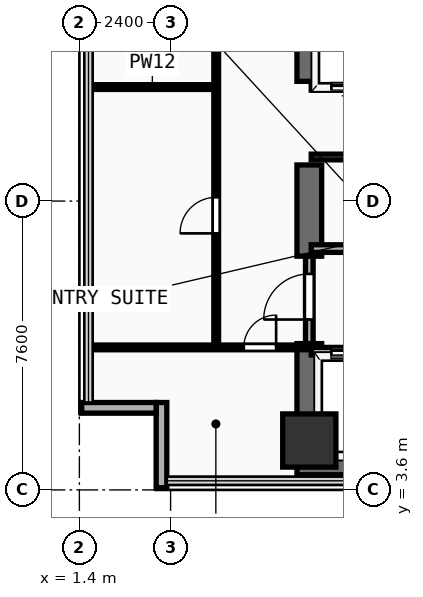
"""IFC4 building model, lengths in metres.
Left out: names, types, materials, properties, quantities, classifications, styles, units other than length and angle.
Written with IfcOpenShell. Run it as: python <this file> out.ifc"""

import sys

from ifc_helpers import new_model, si_unit, direction, frame, frame_2d, origin, origin_2d, place, context, subcontext, project, spatial, rectangle, extrude, element, fill, save


model = new_model("IFC4")
c1 = context("Model", 3, precision=1e-05, world=origin(), true_north=direction((0.0, 1.0)))
c2 = subcontext(c1, "Body", "Model", "MODEL_VIEW")
j1 = project(units=[si_unit("LENGTHUNIT", "METRE"), si_unit("PLANEANGLEUNIT", "RADIAN")], contexts=[c1])
p1 = place(None, origin())
s1 = spatial("IfcSite", under=j1, at=p1, CompositionType="ELEMENT")
p2 = place(p1, origin())
s2 = spatial("IfcBuilding", under=s1, at=p2, CompositionType="ELEMENT")
p3 = place(p2, frame((0.0, 0.0, 137.3)))
s3 = spatial("IfcBuildingStorey", under=s2, at=p3, CompositionType="ELEMENT", Elevation=137.3)
p4 = place(p3, frame((7.125, 4.325, 0.0), z_axis=(0.0, 0.0, 1.0), x_axis=(1.0, 0.0, 0.0)))
e1 = element("IfcWall", 1, at=p4, inside=s3, PredefinedType="SHEAR", context=c2, shape_type="SweptSolid", body=[
    extrude(rectangle(XDim=14.0, YDim=0.65, at=frame_2d((7.0, 0.0))), origin(), (0.0, 0.0, 1.0), 3.42),
])
p5 = place(p3, frame((7.45, 4.65, 0.0), z_axis=(0.0, 0.0, 1.0), x_axis=(0.0, 1.0, 0.0)))
e2 = element("IfcWall", 2, at=p5, inside=s3, PredefinedType="SHEAR", context=c2, shape_type="SweptSolid", body=[
    extrude(rectangle(XDim=2.8, YDim=0.65, at=frame_2d((1.4, 0.0))), origin(), (0.0, 0.0, 1.0), 3.42),
])
p6 = place(p3, frame((7.45, 9.75, 0.0), z_axis=(0.0, 0.0, 1.0), x_axis=(0.0, 1.0, 0.0)))
e3 = element("IfcWall", 3, at=p6, inside=s3, PredefinedType="SHEAR", context=c2, shape_type="SweptSolid", body=[
    extrude(rectangle(XDim=2.4, YDim=0.65, at=frame_2d((1.2, 0.0))), origin(), (0.0, 0.0, 1.0), 3.42),
])
p7 = place(p3, frame((7.45, 14.35, 0.0), z_axis=(0.0, 0.0, 1.0), x_axis=(0.0, 1.0, 0.0)))
e4 = element("IfcWall", 4, at=p7, inside=s3, PredefinedType="SHEAR", context=c2, shape_type="SweptSolid", body=[
    extrude(rectangle(XDim=4.81, YDim=0.65, at=frame_2d((2.405, 0.0))), origin(), (0.0, 0.0, 1.0), 3.42),
])
p8 = place(p3, frame((7.45, 4.9, 0.0), z_axis=(0.0, 0.0, 1.0), x_axis=(1.0, 0.0, 0.0)))
e5 = element("IfcColumn", 5, at=p8, inside=s3, PredefinedType="COLUMN", context=c2, shape_type="SweptSolid", body=[
    extrude(rectangle(XDim=1.4, YDim=1.4, at=origin_2d()), origin(), (0.0, 0.0, 1.0), 3.42),
])
p9 = place(p3, frame((3.56, 3.66, 0.0), z_axis=(0.0, 0.0, 1.0), x_axis=(0.0, 1.0, 0.0)))
e6 = element("IfcWall", 6, at=p9, inside=s3, PredefinedType="SOLIDWALL", context=c2, shape_type="SweptSolid", body=[
    extrude(rectangle(XDim=2.24, YDim=0.28, at=frame_2d((1.12, 0.0))), origin(), (0.0, 0.0, 1.0), 3.42),
])
p10 = place(p3, frame((1.46, 5.76, 0.0), z_axis=(0.0, 0.0, 1.0), x_axis=(1.0, 0.0, 0.0)))
e7 = element("IfcWall", 7, at=p10, inside=s3, PredefinedType="SOLIDWALL", context=c2, shape_type="SweptSolid", body=[
    extrude(rectangle(XDim=1.96, YDim=0.28, at=frame_2d((0.98, 0.0))), origin(), (0.0, 0.0, 1.0), 3.42),
])
p11 = place(p3, frame((7.5, 7.25, 0.0), z_axis=(0.0, 0.0, 1.0), x_axis=(1.0, 0.0, 0.0)))
e8 = element("IfcWall", 8, at=p11, inside=s3, PredefinedType="PARTITIONING", context=c2, shape_type="SweptSolid", body=[
    extrude(rectangle(XDim=8.35, YDim=0.2, at=frame_2d((4.175, 0.0))), origin(), (0.0, 0.0, 1.0), 3.42),
])
p12 = place(p11, frame((0.53, 0.0, 0.0)))
e9 = element("IfcOpeningElement", 9, at=p12, cuts=e8, PredefinedType="OPENING", context=c2, shape_type="SweptSolid", body=[
    extrude(rectangle(XDim=1.1, YDim=2.2, at=frame_2d((0.55, 1.1))), frame((0.0, 0.11, 0.0), z_axis=(0.0, -1.0, 0.0), x_axis=(1.0, 0.0, 0.0)), (0.0, 0.0, 1.0), 0.22),
])
p13 = place(p11, frame((2.37, 0.0, 0.0)))
e10 = element("IfcOpeningElement", 10, at=p13, cuts=e8, PredefinedType="OPENING", context=c2, shape_type="SweptSolid", body=[
    extrude(rectangle(XDim=1.1, YDim=2.2, at=frame_2d((0.55, 1.1))), frame((0.0, 0.11, 0.0), z_axis=(0.0, -1.0, 0.0), x_axis=(1.0, 0.0, 0.0)), (0.0, 0.0, 1.0), 0.22),
])
p14 = place(p11, frame((4.33, 0.0, 0.0)))
e11 = element("IfcOpeningElement", 11, at=p14, cuts=e8, PredefinedType="OPENING", context=c2, shape_type="SweptSolid", body=[
    extrude(rectangle(XDim=1.1, YDim=2.2, at=frame_2d((0.55, 1.1))), frame((0.0, 0.11, 0.0), z_axis=(0.0, -1.0, 0.0), x_axis=(1.0, 0.0, 0.0)), (0.0, 0.0, 1.0), 0.22),
])
p15 = place(p11, frame((6.5, 0.0, 0.0)))
e12 = element("IfcOpeningElement", 12, at=p15, cuts=e8, PredefinedType="OPENING", context=c2, shape_type="SweptSolid", body=[
    extrude(rectangle(XDim=1.1, YDim=2.2, at=frame_2d((0.55, 1.1))), frame((0.0, 0.11, 0.0), z_axis=(0.0, -1.0, 0.0), x_axis=(1.0, 0.0, 0.0)), (0.0, 0.0, 1.0), 0.22),
])
p16 = place(p3, frame((7.5, 9.95, 0.0), z_axis=(0.0, 0.0, 1.0), x_axis=(1.0, 0.0, 0.0)))
e13 = element("IfcWall", 13, at=p16, inside=s3, PredefinedType="PARTITIONING", context=c2, shape_type="SweptSolid", body=[
    extrude(rectangle(XDim=8.35, YDim=0.2, at=frame_2d((4.175, 0.0))), origin(), (0.0, 0.0, 1.0), 3.42),
])
p17 = place(p3, frame((7.45, 7.45, 0.0), z_axis=(0.0, 0.0, 1.0), x_axis=(0.0, 1.0, 0.0)))
e14 = element("IfcWall", 14, at=p17, inside=s3, PredefinedType="PARTITIONING", context=c2, shape_type="SweptSolid", body=[
    extrude(rectangle(XDim=2.3, YDim=0.2, at=frame_2d((1.15, 0.0))), origin(), (0.0, 0.0, 1.0), 2.4),
])
p18 = place(p17, frame((0.633, 0.0, 0.0)))
e15 = element("IfcOpeningElement", 15, at=p18, cuts=e14, PredefinedType="OPENING", context=c2, shape_type="SweptSolid", body=[
    extrude(rectangle(XDim=1.2, YDim=2.25, at=frame_2d((0.6, 1.125))), frame((0.0, 0.11, 0.0), z_axis=(0.0, -1.0, 0.0), x_axis=(1.0, 0.0, 0.0)), (0.0, 0.0, 1.0), 0.22),
])
p19 = place(p3, frame((7.5, 12.36, 0.0), z_axis=(0.0, 0.0, 1.0), x_axis=(1.0, 0.0, 0.0)))
e16 = element("IfcWall", 16, at=p19, inside=s3, PredefinedType="PARTITIONING", context=c2, shape_type="SweptSolid", body=[
    extrude(rectangle(XDim=7.85, YDim=0.15, at=frame_2d((3.925, 0.0))), origin(), (0.0, 0.0, 1.0), 3.42),
])
p20 = place(p19, frame((1.65, 0.0, 0.0)))
e17 = element("IfcOpeningElement", 17, at=p20, cuts=e16, PredefinedType="OPENING", context=c2, shape_type="SweptSolid", body=[
    extrude(rectangle(XDim=0.85, YDim=2.15, at=frame_2d((0.425, 1.075))), frame((0.0, 0.085, 0.0), z_axis=(0.0, -1.0, 0.0), x_axis=(1.0, 0.0, 0.0)), (0.0, 0.0, 1.0), 0.17),
])
p21 = place(p19, frame((5.329, 0.0, 0.0)))
e18 = element("IfcOpeningElement", 18, at=p21, cuts=e16, PredefinedType="OPENING", context=c2, shape_type="SweptSolid", body=[
    extrude(rectangle(XDim=0.85, YDim=2.15, at=frame_2d((0.425, 1.075))), frame((0.0, 0.085, 0.0), z_axis=(0.0, -1.0, 0.0), x_axis=(1.0, 0.0, 0.0)), (0.0, 0.0, 1.0), 0.17),
])
p22 = place(p3, frame((7.5, 14.22, 0.0), z_axis=(0.0, 0.0, 1.0), x_axis=(1.0, 0.0, 0.0)))
e19 = element("IfcWall", 19, at=p22, inside=s3, PredefinedType="PARTITIONING", context=c2, shape_type="SweptSolid", body=[
    extrude(rectangle(XDim=7.85, YDim=0.2, at=frame_2d((3.925, 0.0))), origin(), (0.0, 0.0, 1.0), 3.42),
])
p23 = place(p22, frame((0.53, 0.0, 0.0)))
e20 = element("IfcOpeningElement", 20, at=p23, cuts=e19, PredefinedType="OPENING", context=c2, shape_type="SweptSolid", body=[
    extrude(rectangle(XDim=1.1, YDim=2.2, at=frame_2d((0.55, 1.1))), frame((0.0, 0.11, 0.0), z_axis=(0.0, -1.0, 0.0), x_axis=(1.0, 0.0, 0.0)), (0.0, 0.0, 1.0), 0.22),
])
p24 = place(p22, frame((2.42, 0.0, 0.0)))
e21 = element("IfcOpeningElement", 21, at=p24, cuts=e19, PredefinedType="OPENING", context=c2, shape_type="SweptSolid", body=[
    extrude(rectangle(XDim=1.1, YDim=2.2, at=frame_2d((0.55, 1.1))), frame((0.0, 0.11, 0.0), z_axis=(0.0, -1.0, 0.0), x_axis=(1.0, 0.0, 0.0)), (0.0, 0.0, 1.0), 0.22),
])
p25 = place(p22, frame((4.31, 0.0, 0.0)))
e22 = element("IfcOpeningElement", 22, at=p25, cuts=e19, PredefinedType="OPENING", context=c2, shape_type="SweptSolid", body=[
    extrude(rectangle(XDim=1.1, YDim=2.2, at=frame_2d((0.55, 1.1))), frame((0.0, 0.11, 0.0), z_axis=(0.0, -1.0, 0.0), x_axis=(1.0, 0.0, 0.0)), (0.0, 0.0, 1.0), 0.22),
])
p26 = place(p22, frame((6.2, 0.0, 0.0)))
e23 = element("IfcOpeningElement", 23, at=p26, cuts=e19, PredefinedType="OPENING", context=c2, shape_type="SweptSolid", body=[
    extrude(rectangle(XDim=1.1, YDim=2.2, at=frame_2d((0.55, 1.1))), frame((0.0, 0.11, 0.0), z_axis=(0.0, -1.0, 0.0), x_axis=(1.0, 0.0, 0.0)), (0.0, 0.0, 1.0), 0.22),
])
p27 = place(p3, frame((1.64, 7.35, 0.0), z_axis=(0.0, 0.0, 1.0), x_axis=(1.0, 0.0, 0.0)))
e24 = element("IfcWall", 24, at=p27, inside=s3, PredefinedType="PARTITIONING", context=c2, shape_type="SweptSolid", body=[
    extrude(rectangle(XDim=5.76, YDim=0.125, at=frame_2d((2.88, 0.0))), origin(), (0.0, 0.0, 1.0), 3.42),
])
p28 = place(p27, frame((4.087, 0.0, 0.0)))
e25 = element("IfcOpeningElement", 25, at=p28, cuts=e24, PredefinedType="OPENING", context=c2, shape_type="SweptSolid", body=[
    extrude(rectangle(XDim=0.85, YDim=2.15, at=frame_2d((0.425, 1.075))), frame((0.0, 0.073, 0.0), z_axis=(0.0, -1.0, 0.0), x_axis=(1.0, 0.0, 0.0)), (0.0, 0.0, 1.0), 0.145),
])
p29 = place(p3, frame((5.0, 7.5, 0.0), z_axis=(0.0, 0.0, 1.0), x_axis=(0.0, 1.0, 0.0)))
e26 = element("IfcWall", 26, at=p29, inside=s3, PredefinedType="PARTITIONING", context=c2, shape_type="SweptSolid", body=[
    extrude(rectangle(XDim=17.75, YDim=0.125, at=frame_2d((8.875, 0.0))), origin(), (0.0, 0.0, 1.0), 3.42),
])
p30 = place(p29, frame((2.85, 0.0, 0.0)))
e27 = element("IfcOpeningElement", 27, at=p30, cuts=e26, PredefinedType="OPENING", context=c2, shape_type="SweptSolid", body=[
    extrude(rectangle(XDim=0.95, YDim=2.15, at=frame_2d((0.475, 1.075))), frame((0.0, 0.073, 0.0), z_axis=(0.0, -1.0, 0.0), x_axis=(1.0, 0.0, 0.0)), (0.0, 0.0, 1.0), 0.145),
])
p31 = place(p29, frame((11.821, 0.0, 0.0)))
e28 = element("IfcOpeningElement", 28, at=p31, cuts=e26, PredefinedType="OPENING", context=c2, shape_type="SweptSolid", body=[
    extrude(rectangle(XDim=0.95, YDim=2.15, at=frame_2d((0.475, 1.075))), frame((0.0, 0.073, 0.0), z_axis=(0.0, -1.0, 0.0), x_axis=(1.0, 0.0, 0.0)), (0.0, 0.0, 1.0), 0.145),
])
p32 = place(p3, frame((1.64, 14.2, 0.0), z_axis=(0.0, 0.0, 1.0), x_axis=(1.0, 0.0, 0.0)))
e29 = element("IfcWall", 29, at=p32, inside=s3, PredefinedType="PARTITIONING", context=c2, shape_type="SweptSolid", body=[
    extrude(rectangle(XDim=3.36, YDim=0.125, at=frame_2d((1.68, 0.0))), origin(), (0.0, 0.0, 1.0), 3.42),
])
p33 = place(p12, origin())
e30 = element("IfcDoor", 30, at=p33, inside=s3, OperationType="SLIDING_TO_LEFT", PredefinedType="DOOR", context=c2, shape_type="SweptSolid", body=[
    extrude(rectangle(XDim=1.1, YDim=2.2, at=frame_2d((0.55, 1.1))), frame((0.0, 0.025, 0.0), z_axis=(0.0, -1.0, 0.0), x_axis=(1.0, 0.0, 0.0)), (0.0, 0.0, 1.0), 0.05),
])
fill(e9, e30)
p34 = place(p18, frame((1.2, 0.0, 0.0), z_axis=(0.0, 0.0, 1.0), x_axis=(-1.0, 0.0, 0.0)))
e31 = element("IfcDoor", 31, at=p34, inside=s3, OperationType="SINGLE_SWING_RIGHT", PredefinedType="DOOR", context=c2, shape_type="SweptSolid", body=[
    extrude(rectangle(XDim=1.2, YDim=2.25, at=frame_2d((0.6, 1.125))), frame((0.0, 0.025, 0.0), z_axis=(0.0, -1.0, 0.0), x_axis=(1.0, 0.0, 0.0)), (0.0, 0.0, 1.0), 0.05),
])
fill(e15, e31)
p35 = place(p23, frame((1.1, 0.0, 0.0), z_axis=(0.0, 0.0, 1.0), x_axis=(-1.0, 0.0, 0.0)))
e32 = element("IfcDoor", 32, at=p35, inside=s3, OperationType="SLIDING_TO_LEFT", PredefinedType="DOOR", context=c2, shape_type="SweptSolid", body=[
    extrude(rectangle(XDim=1.1, YDim=2.2, at=frame_2d((0.55, 1.1))), frame((0.0, 0.025, 0.0), z_axis=(0.0, -1.0, 0.0), x_axis=(1.0, 0.0, 0.0)), (0.0, 0.0, 1.0), 0.05),
])
fill(e20, e32)
p36 = place(p28, origin())
e33 = element("IfcDoor", 33, at=p36, inside=s3, OperationType="SINGLE_SWING_RIGHT", PredefinedType="DOOR", context=c2, shape_type="SweptSolid", body=[
    extrude(rectangle(XDim=0.85, YDim=2.15, at=frame_2d((0.425, 1.075))), frame((0.0, 0.025, 0.0), z_axis=(0.0, -1.0, 0.0), x_axis=(1.0, 0.0, 0.0)), (0.0, 0.0, 1.0), 0.05),
])
fill(e25, e33)
p37 = place(p30, origin())
e34 = element("IfcDoor", 34, at=p37, inside=s3, OperationType="SINGLE_SWING_LEFT", PredefinedType="DOOR", context=c2, shape_type="SweptSolid", body=[
    extrude(rectangle(XDim=0.95, YDim=2.15, at=frame_2d((0.475, 1.075))), frame((0.0, 0.025, 0.0), z_axis=(0.0, -1.0, 0.0), x_axis=(1.0, 0.0, 0.0)), (0.0, 0.0, 1.0), 0.05),
])
fill(e27, e34)
save(model, sys.argv[1])
